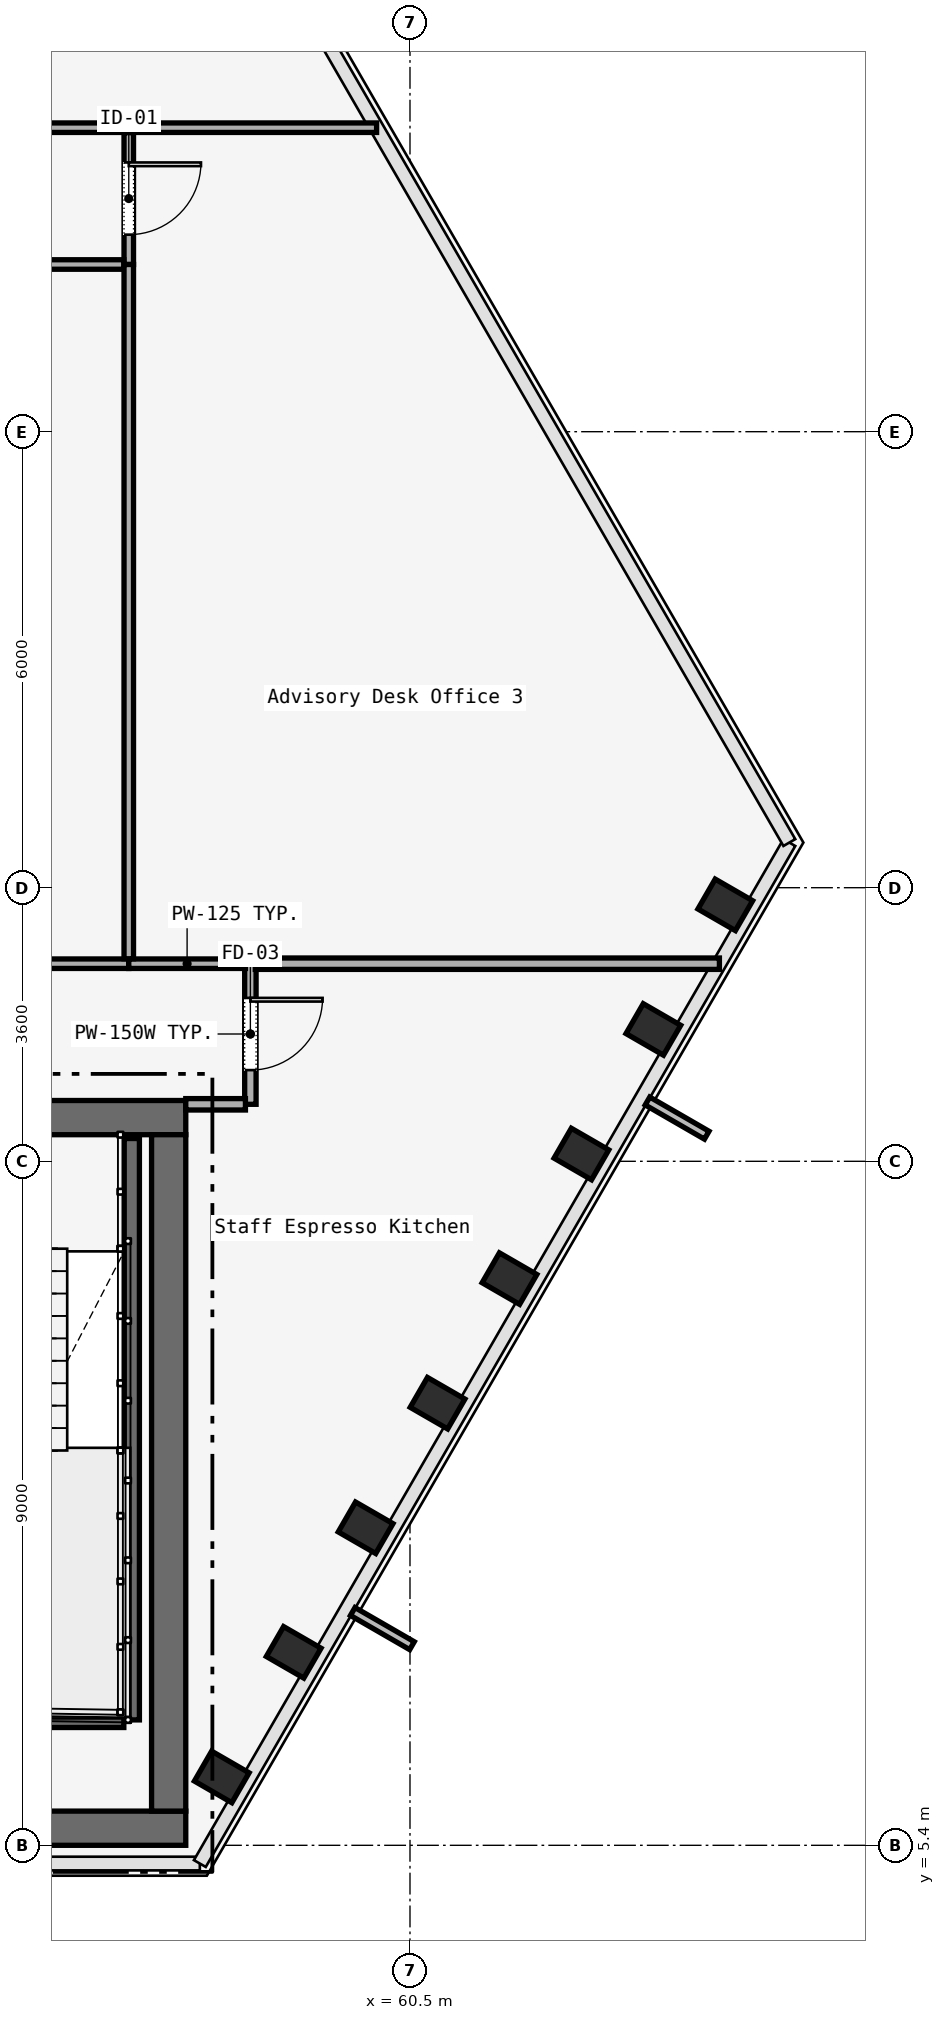
"""IFC4 building model, lengths in metres.
Left out: names, types, materials, properties, quantities, classifications, styles, units other than length and angle.
Written with IfcOpenShell. Run it as: python <this file> out.ifc"""

import sys

from ifc_helpers import new_model, si_unit, direction, frame, frame_2d, origin, origin_2d, place, context, subcontext, project, spatial, rectangle, i_section, extrude, element, fill, save


model = new_model("IFC4")
c1 = context("Model", 3, precision=1e-05, world=origin(), true_north=direction((0.0, 1.0)))
c2 = subcontext(c1, "Body", "Model", "MODEL_VIEW")
j1 = project(units=[si_unit("LENGTHUNIT", "METRE"), si_unit("PLANEANGLEUNIT", "RADIAN")], contexts=[c1])
p1 = place(None, origin())
s1 = spatial("IfcSite", under=j1, at=p1, CompositionType="ELEMENT")
p2 = place(p1, origin())
s2 = spatial("IfcBuilding", under=s1, at=p2, CompositionType="ELEMENT")
p3 = place(p2, frame((0.0, 0.0, 58.8)))
s3 = spatial("IfcBuildingStorey", under=s2, at=p3, CompositionType="ELEMENT", Elevation=58.8)
p4 = place(p3, frame((26.45, 14.975, 0.0), z_axis=(0.0, 0.0, 1.0), x_axis=(1.0, 0.0, 0.0)))
e1 = element("IfcWall", 1, at=p4, inside=s3, PredefinedType="SOLIDWALL", context=c2, shape_type="SweptSolid", body=[
    extrude(rectangle(XDim=31.1, YDim=0.45, at=frame_2d((15.55, 0.0))), origin(), (0.0, 0.0, 1.0), 3.58),
])
p5 = place(p4, frame((1.65, 0.0, 0.0)))
e2 = element("IfcOpeningElement", 2, at=p5, cuts=e1, PredefinedType="OPENING", context=c2, shape_type="SweptSolid", body=[
    extrude(rectangle(XDim=1.1, YDim=2.2, at=frame_2d((0.55, 1.1))), frame((0.0, 0.225, 0.0), z_axis=(0.0, -1.0, 0.0), x_axis=(1.0, 0.0, 0.0)), (0.0, 0.0, 1.0), 0.45),
])
p6 = place(p4, frame((13.65, 0.0, 0.0)))
e3 = element("IfcOpeningElement", 3, at=p6, cuts=e1, PredefinedType="OPENING", context=c2, shape_type="SweptSolid", body=[
    extrude(rectangle(XDim=1.1, YDim=2.2, at=frame_2d((0.55, 1.1))), frame((0.0, 0.225, 0.0), z_axis=(0.0, -1.0, 0.0), x_axis=(1.0, 0.0, 0.0)), (0.0, 0.0, 1.0), 0.45),
])
p7 = place(p4, frame((25.55, 0.0, 0.0)))
e4 = element("IfcOpeningElement", 4, at=p7, cuts=e1, PredefinedType="OPENING", context=c2, shape_type="SweptSolid", body=[
    extrude(rectangle(XDim=1.1, YDim=2.2, at=frame_2d((0.55, 1.1))), frame((0.0, 0.225, 0.0), z_axis=(0.0, -1.0, 0.0), x_axis=(1.0, 0.0, 0.0)), (0.0, 0.0, 1.0), 0.45),
])
p8 = place(p4, frame((10.7, 0.0, 0.0)))
e5 = element("IfcOpeningElement", 5, at=p8, cuts=e1, PredefinedType="OPENING", context=c2, shape_type="SweptSolid", body=[
    extrude(rectangle(XDim=1.4, YDim=2.2, at=frame_2d((0.7, 1.1))), frame((0.0, 0.225, 0.0), z_axis=(0.0, -1.0, 0.0), x_axis=(1.0, 0.0, 0.0)), (0.0, 0.0, 1.0), 0.45),
])
p9 = place(p4, frame((19.35, 0.0, 0.0)))
e6 = element("IfcOpeningElement", 6, at=p9, cuts=e1, PredefinedType="OPENING", context=c2, shape_type="SweptSolid", body=[
    extrude(rectangle(XDim=1.1, YDim=2.2, at=frame_2d((0.55, 1.1))), frame((0.0, 0.225, 0.0), z_axis=(0.0, -1.0, 0.0), x_axis=(1.0, 0.0, 0.0)), (0.0, 0.0, 1.0), 0.45),
])
p10 = place(p4, frame((21.4, 0.0, 0.0)))
e7 = element("IfcOpeningElement", 7, at=p10, cuts=e1, PredefinedType="OPENING", context=c2, shape_type="SweptSolid", body=[
    extrude(rectangle(XDim=0.9, YDim=2.1, at=frame_2d((0.45, 1.05))), frame((0.0, 0.225, 0.0), z_axis=(0.0, -1.0, 0.0), x_axis=(1.0, 0.0, 0.0)), (0.0, 0.0, 1.0), 0.45),
])
p11 = place(p4, frame((23.35, 0.0, 0.0)))
e8 = element("IfcOpeningElement", 8, at=p11, cuts=e1, PredefinedType="OPENING", context=c2, shape_type="SweptSolid", body=[
    extrude(rectangle(XDim=1.3, YDim=2.3, at=frame_2d((0.65, 1.15))), frame((0.0, 0.225, 0.0), z_axis=(0.0, -1.0, 0.0), x_axis=(1.0, 0.0, 0.0)), (0.0, 0.0, 1.0), 0.45),
])
p12 = place(p3, frame((26.45, 5.625, 0.0), z_axis=(0.0, 0.0, 1.0), x_axis=(1.0, 0.0, 0.0)))
e9 = element("IfcWall", 9, at=p12, inside=s3, PredefinedType="SOLIDWALL", context=c2, shape_type="SweptSolid", body=[
    extrude(rectangle(XDim=31.1, YDim=0.45, at=frame_2d((15.55, 0.0))), origin(), (0.0, 0.0, 1.0), 3.58),
])
p13 = place(p3, frame((57.325, 5.85, 0.0), z_axis=(0.0, 0.0, 1.0), x_axis=(0.0, 1.0, 0.0)))
e10 = element("IfcWall", 10, at=p13, inside=s3, PredefinedType="SOLIDWALL", context=c2, shape_type="SweptSolid", body=[
    extrude(rectangle(XDim=8.9, YDim=0.45, at=frame_2d((4.45, 0.0))), origin(), (0.0, 0.0, 1.0), 3.58),
])
for number, where, z_axis, x_axis in (
    (11, (58.023, 6.3, 0.0), (0.0, 0.0, 1.0), (0.5, 0.866, 0.0)),
    (12, (58.97, 7.939, 0.0), (0.0, 0.0, 1.0), (0.5, 0.866, 0.0)),
    (13, (59.916, 9.578, 0.0), (0.0, 0.0, 1.0), (0.5, 0.866, 0.0)),
    (14, (60.863, 11.217, 0.0), (0.0, 0.0, 1.0), (0.5, 0.866, 0.0)),
    (15, (61.809, 12.857, 0.0), (0.0, 0.0, 1.0), (0.5, 0.866, 0.0)),
    (16, (62.756, 14.496, 0.0), (0.0, 0.0, 1.0), (0.5, 0.866, 0.0)),
    (17, (63.702, 16.135, 0.0), (0.0, 0.0, 1.0), (0.5, 0.866, 0.0)),
    (18, (64.648, 17.774, 0.0), (0.0, 0.0, 1.0), (0.5, 0.866, 0.0)),
):
    element("IfcColumn", number, at=place(p3, frame(where, z_axis=z_axis, x_axis=x_axis)), inside=s3, PredefinedType="COLUMN", context=c2, shape_type="SweptSolid", body=[
        extrude(i_section(OverallWidth=0.454, OverallDepth=0.569, WebThickness=0.078, FlangeThickness=0.08, FilletRadius=0.015, at=origin_2d()), origin(), (0.0, 0.0, 1.0), 3.58),
    ])
p14 = place(p3, frame((56.84, 14.7, 0.0), z_axis=(0.0, 0.0, 1.0), x_axis=(0.0, -1.0, 0.0)))
e19 = element("IfcWall", 19, at=p14, inside=s3, PredefinedType="SOLIDWALL", context=c2, shape_type="SweptSolid", body=[
    extrude(rectangle(XDim=7.65, YDim=0.2, at=frame_2d((3.825, 0.0))), origin(), (0.0, 0.0, 1.0), 3.8),
])
p15 = place(p3, frame((53.62, 7.05, 0.0), z_axis=(0.0, 0.0, 1.0), x_axis=(1.0, 0.0, 0.0)))
e20 = element("IfcWall", 20, at=p15, inside=s3, PredefinedType="SOLIDWALL", context=c2, shape_type="SweptSolid", body=[
    extrude(rectangle(XDim=3.115, YDim=0.2, at=frame_2d((1.558, 0.0))), origin(), (0.0, 0.0, 1.0), 3.8),
])
p16 = place(p3, frame((58.4, 17.0, 0.0), z_axis=(0.0, 0.0, 1.0), x_axis=(0.0, -1.0, 0.0)))
e21 = element("IfcWall", 21, at=p16, inside=s3, PredefinedType="PARTITIONING", context=c2, shape_type="SweptSolid", body=[
    extrude(rectangle(XDim=1.85, YDim=0.15, at=frame_2d((0.925, 0.0))), origin(), (0.0, 0.0, 1.0), 2.933),
])
p17 = place(p16, frame((0.45, 0.0, 0.0)))
e22 = element("IfcOpeningElement", 22, at=p17, cuts=e21, PredefinedType="OPENING", context=c2, shape_type="SweptSolid", body=[
    extrude(rectangle(XDim=0.95, YDim=2.2, at=frame_2d((0.475, 1.1))), frame((0.0, 0.075, 0.0), z_axis=(0.0, -1.0, 0.0), x_axis=(1.0, 0.0, 0.0)), (0.0, 0.0, 1.0), 0.15),
])
p18 = place(p3, frame((58.335, 15.15, 0.0), z_axis=(0.0, 0.0, 1.0), x_axis=(-1.0, 0.0, 0.0)))
e23 = element("IfcWall", 23, at=p18, inside=s3, PredefinedType="PARTITIONING", context=c2, shape_type="SweptSolid", body=[
    extrude(rectangle(XDim=0.785, YDim=0.15, at=frame_2d((0.393, 0.0))), origin(), (0.0, 0.0, 1.0), 2.933),
])
p19 = place(p3, frame((49.0, 28.0, 0.0), z_axis=(0.0, 0.0, 1.0), x_axis=(1.0, 0.0, 0.0)))
e24 = element("IfcWall", 24, at=p19, inside=s3, PredefinedType="PARTITIONING", context=c2, shape_type="SweptSolid", body=[
    extrude(rectangle(XDim=7.8, YDim=0.125, at=frame_2d((3.9, 0.0))), origin(), (0.0, 0.0, 1.0), 2.933),
])
p20 = place(p19, frame((3.425, 0.0, 0.0)))
e25 = element("IfcOpeningElement", 25, at=p20, cuts=e24, PredefinedType="OPENING", context=c2, shape_type="SweptSolid", body=[
    extrude(rectangle(XDim=0.95, YDim=2.2, at=frame_2d((0.475, 1.1))), frame((0.0, 0.062, 0.0), z_axis=(0.0, -1.0, 0.0), x_axis=(1.0, 0.0, 0.0)), (0.0, 0.0, 1.0), 0.125),
])
p21 = place(p3, frame((56.8, 27.935, 0.0), z_axis=(0.0, 0.0, 1.0), x_axis=(0.0, -1.0, 0.0)))
e26 = element("IfcWall", 26, at=p21, inside=s3, PredefinedType="PARTITIONING", context=c2, shape_type="SweptSolid", body=[
    extrude(rectangle(XDim=1.735, YDim=0.125, at=frame_2d((0.868, 0.0))), origin(), (0.0, 0.0, 1.0), 2.933),
])
p22 = place(p21, frame((0.393, 0.0, 0.0)))
e27 = element("IfcOpeningElement", 27, at=p22, cuts=e26, PredefinedType="OPENING", context=c2, shape_type="SweptSolid", body=[
    extrude(rectangle(XDim=0.95, YDim=2.2, at=frame_2d((0.475, 1.1))), frame((0.0, 0.062, 0.0), z_axis=(0.0, -1.0, 0.0), x_axis=(1.0, 0.0, 0.0)), (0.0, 0.0, 1.0), 0.125),
])
p23 = place(p3, frame((56.735, 26.2, 0.0), z_axis=(0.0, 0.0, 1.0), x_axis=(-1.0, 0.0, 0.0)))
e28 = element("IfcWall", 28, at=p23, inside=s3, PredefinedType="PARTITIONING", context=c2, shape_type="SweptSolid", body=[
    extrude(rectangle(XDim=11.92, YDim=0.125, at=frame_2d((5.96, 0.0))), origin(), (0.0, 0.0, 1.0), 2.933),
])
p24 = place(p3, frame((44.815, 17.0, 0.0), z_axis=(0.0, 0.0, 1.0), x_axis=(1.0, 0.0, 0.0)))
e29 = element("IfcWall", 29, at=p24, inside=s3, PredefinedType="PARTITIONING", context=c2, shape_type="SweptSolid", body=[
    extrude(rectangle(XDim=11.985, YDim=0.125, at=frame_2d((5.993, 0.0))), origin(), (0.0, 0.0, 1.0), 2.933),
])
p25 = place(p24, frame((5.518, 0.0, 0.0)))
e30 = element("IfcOpeningElement", 30, at=p25, cuts=e29, PredefinedType="OPENING", context=c2, shape_type="SweptSolid", body=[
    extrude(rectangle(XDim=0.95, YDim=2.2, at=frame_2d((0.475, 1.1))), frame((0.0, 0.062, 0.0), z_axis=(0.0, -1.0, 0.0), x_axis=(1.0, 0.0, 0.0)), (0.0, 0.0, 1.0), 0.125),
])
p26 = place(p3, frame((56.8, 17.0, 0.0), z_axis=(0.0, 0.0, 1.0), x_axis=(1.0, 0.0, 0.0)))
e31 = element("IfcWall", 31, at=p26, inside=s3, PredefinedType="PARTITIONING", context=c2, shape_type="SweptSolid", body=[
    extrude(rectangle(XDim=1.535, YDim=0.125, at=frame_2d((0.768, 0.0))), origin(), (0.0, 0.0, 1.0), 2.933),
])
p27 = place(p3, frame((58.465, 17.0, 0.0), z_axis=(0.0, 0.0, 1.0), x_axis=(1.0, 0.0, 0.0)))
e32 = element("IfcWall", 32, at=p27, inside=s3, PredefinedType="PARTITIONING", context=c2, shape_type="SweptSolid", body=[
    extrude(rectangle(XDim=6.106, YDim=0.15, at=frame_2d((3.053, 0.0))), origin(), (0.0, 0.0, 1.0), 2.933),
])
p28 = place(p3, frame((56.8, 26.2, 0.0), z_axis=(0.0, 0.0, 1.0), x_axis=(0.0, -1.0, 0.0)))
e33 = element("IfcWall", 33, at=p28, inside=s3, PredefinedType="PARTITIONING", context=c2, shape_type="SweptSolid", body=[
    extrude(rectangle(XDim=9.135, YDim=0.125, at=frame_2d((4.567, 0.0))), origin(), (0.0, 0.0, 1.0), 2.933),
])
p29 = place(p3, frame((56.8, 28.0, 0.0), z_axis=(0.0, 0.0, 1.0), x_axis=(1.0, 0.0, 0.0)))
e34 = element("IfcWall", 34, at=p29, inside=s3, PredefinedType="PARTITIONING", context=c2, shape_type="SweptSolid", body=[
    extrude(rectangle(XDim=3.26, YDim=0.125, at=frame_2d((1.63, 0.0))), origin(), (0.0, 0.0, 1.0), 2.933),
])
p30 = place(p17, origin())
e35 = element("IfcDoor", 35, at=p30, inside=s3, OperationType="SINGLE_SWING_RIGHT", PredefinedType="DOOR", context=c2, shape_type="SweptSolid", body=[
    extrude(rectangle(XDim=0.95, YDim=2.2, at=frame_2d((0.475, 1.1))), frame((0.0, 0.025, 0.0), z_axis=(0.0, -1.0, 0.0), x_axis=(1.0, 0.0, 0.0)), (0.0, 0.0, 1.0), 0.05),
])
fill(e22, e35)
p31 = place(p22, origin())
e36 = element("IfcDoor", 36, at=p31, inside=s3, OperationType="SINGLE_SWING_LEFT", PredefinedType="DOOR", context=c2, shape_type="SweptSolid", body=[
    extrude(rectangle(XDim=0.95, YDim=2.2, at=frame_2d((0.475, 1.1))), frame((0.0, 0.025, 0.0), z_axis=(0.0, -1.0, 0.0), x_axis=(1.0, 0.0, 0.0)), (0.0, 0.0, 1.0), 0.05),
])
fill(e27, e36)
save(model, sys.argv[1])
